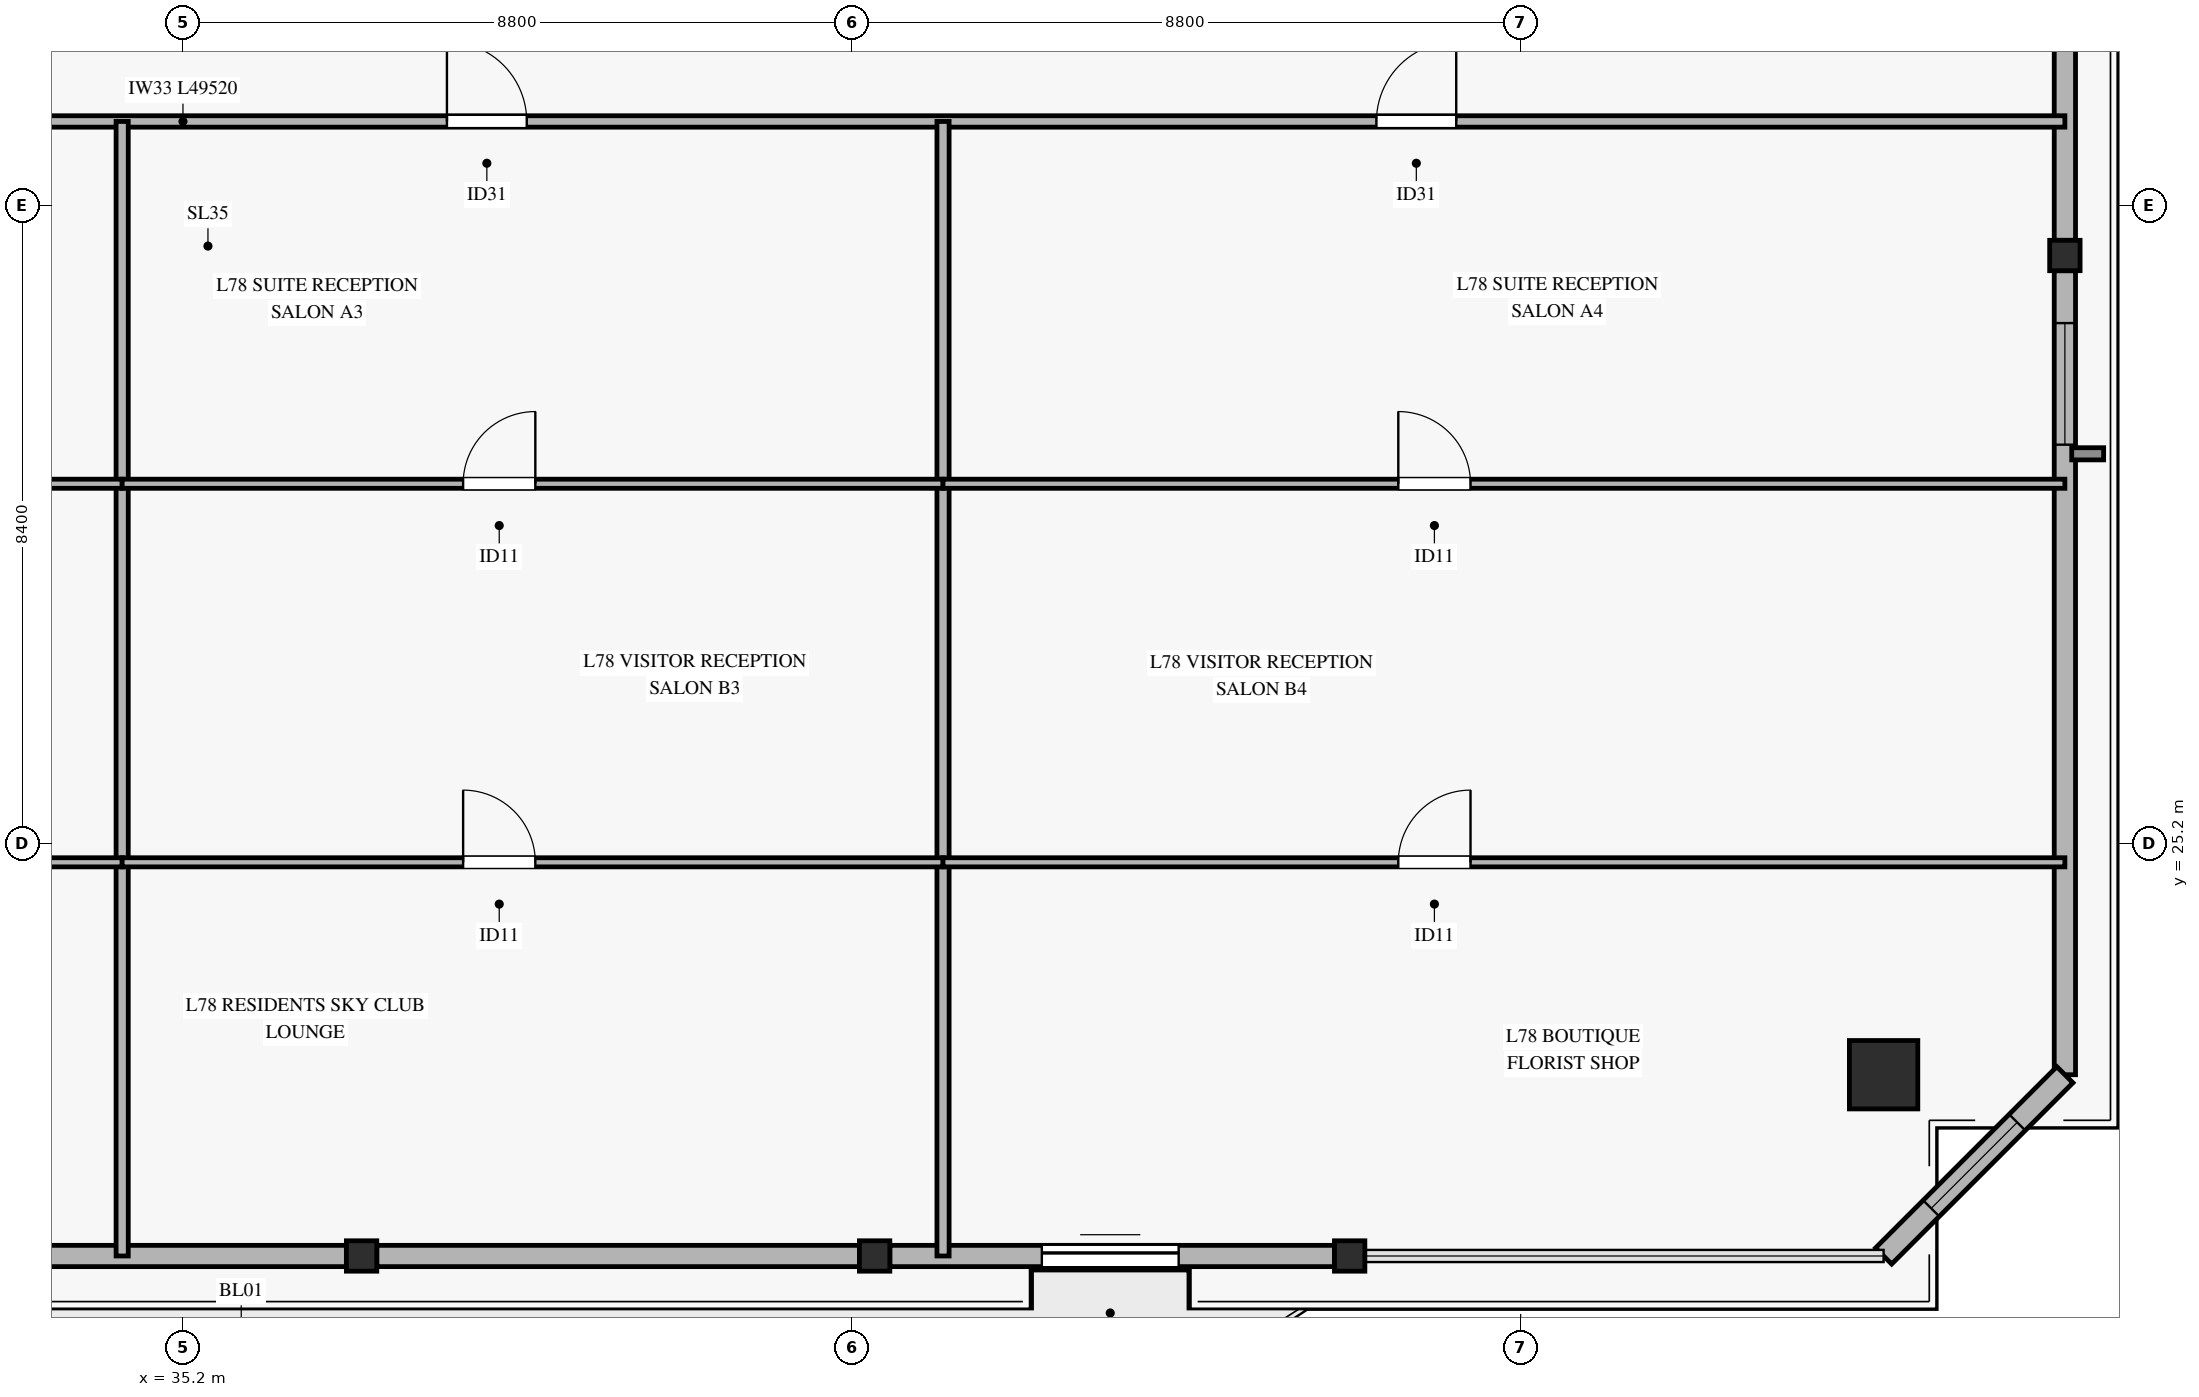
"""IFC4 building model, lengths in metres.
Left out: names, types, materials, properties, quantities, classifications, styles, units other than length and angle.
Written with IfcOpenShell. Run it as: python <this file> out.ifc"""

import sys

from ifc_helpers import new_model, si_unit, direction, frame, frame_2d, origin, origin_2d, place, context, subcontext, project, spatial, rectangle, hollow_rectangle, extrude, source, transform, mapped, element, fill, save


model = new_model("IFC4")
c1 = context("Model", 3, precision=1e-05, world=origin(), true_north=direction((0.0, 1.0)))
c2 = subcontext(c1, "Body", "Model", "MODEL_VIEW")
j1 = project(units=[si_unit("LENGTHUNIT", "METRE"), si_unit("PLANEANGLEUNIT", "RADIAN")], contexts=[c1])
p1 = place(None, origin())
s1 = spatial("IfcSite", under=j1, at=p1, CompositionType="ELEMENT")
p2 = place(p1, origin())
s2 = spatial("IfcBuilding", under=s1, at=p2, CompositionType="ELEMENT")
p3 = place(p2, frame((0.0, 0.0, 304.0)))
s3 = spatial("IfcBuildingStorey", under=s2, at=p3, CompositionType="ELEMENT", Elevation=304.0)
m1 = source(origin(), c2, "Body", "SweptSolid", [
    extrude(hollow_rectangle(XDim=0.9, YDim=0.9, WallThickness=0.04, at=origin_2d()), origin(), (0.0, 0.0, 1.0), 3.185),
])
p4 = place(p3, frame((57.575, 22.157, 0.0), z_axis=(0.0, 0.0, 1.0), x_axis=(1.0, 0.0, 0.0)))
e1 = element("IfcColumn", 1, at=p4, inside=s3, PredefinedType="COLUMN", context=c2, shape_type="MappedRepresentation", body=[
    mapped(m1, transform((0.0, 0.0, 0.0), x_axis=(1.0, 0.0, 0.0), y_axis=(0.0, 1.0, 0.0), z_axis=(0.0, 0.0, 1.0), scale=1.0)),
])
m2 = source(origin(), c2, "Body", "SweptSolid", [
    extrude(hollow_rectangle(XDim=0.4, YDim=0.4, WallThickness=0.02, at=origin_2d()), origin(), (0.0, 0.0, 1.0), 3.185),
])
for number, where, z_axis, x_axis in (
    (2, (37.55, 19.772, 0.0), (0.0, 0.0, 1.0), (1.0, 0.0, 0.0)),
    (3, (44.3, 19.772, 0.0), (0.0, 0.0, 1.0), (1.0, 0.0, 0.0)),
    (4, (50.55, 19.772, 0.0), (0.0, 0.0, 1.0), (1.0, 0.0, 0.0)),
    (5, (59.96, 32.936, 0.0), (0.0, 0.0, 1.0), (1.0, 0.0, 0.0)),
):
    element("IfcColumn", number, at=place(p3, frame(where, z_axis=z_axis, x_axis=x_axis)), inside=s3, PredefinedType="COLUMN", context=c2, shape_type="MappedRepresentation", body=[
        mapped(m2, transform((0.0, 0.0, 0.0), x_axis=(1.0, 0.0, 0.0), y_axis=(0.0, 1.0, 0.0), z_axis=(0.0, 0.0, 1.0), scale=1.0)),
    ])
for number, where, z_axis, x_axis in (
    (6, (31.0, 19.772, 0.0), (0.0, 0.0, 1.0), (1.0, 0.0, 0.0)),
    (7, (37.75, 19.772, 0.0), (0.0, 0.0, 1.0), (1.0, 0.0, 0.0)),
):
    element("IfcWall", number, at=place(p3, frame(where, z_axis=z_axis, x_axis=x_axis)), inside=s3, PredefinedType="SOLIDWALL", context=c2, shape_type="SweptSolid", body=[
        extrude(rectangle(XDim=6.35, YDim=0.28, at=frame_2d((3.175, 0.0))), origin(), (0.0, 0.0, 1.0), 2.815),
    ])
p5 = place(p3, frame((44.5, 19.772, 0.0), z_axis=(0.0, 0.0, 1.0), x_axis=(1.0, 0.0, 0.0)))
e8 = element("IfcWall", 8, at=p5, inside=s3, PredefinedType="SOLIDWALL", context=c2, shape_type="SweptSolid", body=[
    extrude(rectangle(XDim=5.85, YDim=0.28, at=frame_2d((2.925, 0.0))), origin(), (0.0, 0.0, 1.0), 2.815),
])
p6 = place(p5, frame((2.0, 0.0, 0.0)))
e9 = element("IfcOpeningElement", 9, at=p6, cuts=e8, PredefinedType="OPENING", context=c2, shape_type="SweptSolid", body=[
    extrude(rectangle(XDim=1.8, YDim=2.25, at=frame_2d((0.9, 1.125))), frame((0.0, 0.15, 0.0), z_axis=(0.0, -1.0, 0.0), x_axis=(1.0, 0.0, 0.0)), (0.0, 0.0, 1.0), 0.3),
])
p7 = place(p3, frame((59.96, 22.157, 0.0), z_axis=(0.0, 0.0, 1.0), x_axis=(0.0, 1.0, 0.0)))
e10 = element("IfcWall", 10, at=p7, inside=s3, PredefinedType="SOLIDWALL", context=c2, shape_type="SweptSolid", body=[
    extrude(rectangle(XDim=10.579, YDim=0.28, at=frame_2d((5.29, 0.0))), origin(), (0.0, 0.0, 1.0), 2.815),
])
p8 = place(p7, frame((8.29, 0.0, 0.45)))
e11 = element("IfcOpeningElement", 11, at=p8, cuts=e10, PredefinedType="OPENING", context=c2, shape_type="SweptSolid", body=[
    extrude(rectangle(XDim=1.6, YDim=2.0, at=frame_2d((0.8, 1.0))), frame((0.0, 0.15, 0.0), z_axis=(0.0, -1.0, 0.0), x_axis=(1.0, 0.0, 0.0)), (0.0, 0.0, 1.0), 0.3),
])
p9 = place(p3, frame((59.96, 33.136, 0.0), z_axis=(0.0, 0.0, 1.0), x_axis=(0.0, 1.0, 0.0)))
e12 = element("IfcWall", 12, at=p9, inside=s3, PredefinedType="SOLIDWALL", context=c2, shape_type="SweptSolid", body=[
    extrude(rectangle(XDim=10.579, YDim=0.28, at=frame_2d((5.29, 0.0))), origin(), (0.0, 0.0, 1.0), 2.815),
])
p10 = place(p9, frame((4.719, 0.0, 0.45)))
e13 = element("IfcOpeningElement", 13, at=p10, cuts=e12, PredefinedType="OPENING", context=c2, shape_type="SweptSolid", body=[
    extrude(rectangle(XDim=2.2, YDim=2.1, at=frame_2d((1.1, 1.05))), frame((0.0, 0.15, 0.0), z_axis=(0.0, -1.0, 0.0), x_axis=(1.0, 0.0, 0.0)), (0.0, 0.0, 1.0), 0.3),
])
p11 = place(p3, frame((57.575, 19.772, 0.0), z_axis=(0.0, 0.0, 1.0), x_axis=(0.707106781187, 0.707106781187, 0.0)))
e14 = element("IfcWall", 14, at=p11, inside=s3, PredefinedType="SOLIDWALL", context=c2, shape_type="SweptSolid", body=[
    extrude(rectangle(XDim=3.373, YDim=0.3, at=frame_2d((1.687, 0.0))), origin(), (0.0, 0.0, 1.0), 2.815),
])
p12 = place(p11, frame((0.886, 0.0, 0.45)))
e15 = element("IfcOpeningElement", 15, at=p12, cuts=e14, PredefinedType="OPENING", context=c2, shape_type="SweptSolid", body=[
    extrude(rectangle(XDim=1.6, YDim=2.0, at=frame_2d((0.8, 1.0))), frame((0.0, 0.16, 0.0), z_axis=(0.0, -1.0, 0.0), x_axis=(1.0, 0.0, 0.0)), (0.0, 0.0, 1.0), 0.32),
])
p13 = place(p3, frame((10.44, 34.7, 0.0), z_axis=(0.0, 0.0, 1.0), x_axis=(1.0, 0.0, 0.0)))
e16 = element("IfcWall", 16, at=p13, inside=s3, PredefinedType="PARTITIONING", context=c2, shape_type="SweptSolid", body=[
    extrude(rectangle(XDim=49.52, YDim=0.15, at=frame_2d((24.76, 0.0))), origin(), (0.0, 0.0, 1.0), 2.47),
])
p14 = place(p13, frame((4.382, 0.0, 0.0)))
e17 = element("IfcOpeningElement", 17, at=p14, cuts=e16, PredefinedType="OPENING", context=c2, shape_type="SweptSolid", body=[
    extrude(rectangle(XDim=1.05, YDim=2.15, at=frame_2d((0.525, 1.075))), frame((0.0, 0.085, 0.0), z_axis=(0.0, -1.0, 0.0), x_axis=(1.0, 0.0, 0.0)), (0.0, 0.0, 1.0), 0.17),
])
p15 = place(p13, frame((15.945, 0.0, 0.0)))
e18 = element("IfcOpeningElement", 18, at=p15, cuts=e16, PredefinedType="OPENING", context=c2, shape_type="SweptSolid", body=[
    extrude(rectangle(XDim=1.05, YDim=2.15, at=frame_2d((0.525, 1.075))), frame((0.0, 0.085, 0.0), z_axis=(0.0, -1.0, 0.0), x_axis=(1.0, 0.0, 0.0)), (0.0, 0.0, 1.0), 0.17),
])
p16 = place(p13, frame((28.233, 0.0, 0.0)))
e19 = element("IfcOpeningElement", 19, at=p16, cuts=e16, PredefinedType="OPENING", context=c2, shape_type="SweptSolid", body=[
    extrude(rectangle(XDim=1.05, YDim=2.15, at=frame_2d((0.525, 1.075))), frame((0.0, 0.085, 0.0), z_axis=(0.0, -1.0, 0.0), x_axis=(1.0, 0.0, 0.0)), (0.0, 0.0, 1.0), 0.17),
])
p17 = place(p13, frame((40.462, 0.0, 0.0)))
e20 = element("IfcOpeningElement", 20, at=p17, cuts=e16, PredefinedType="OPENING", context=c2, shape_type="SweptSolid", body=[
    extrude(rectangle(XDim=1.05, YDim=2.15, at=frame_2d((0.525, 1.075))), frame((0.0, 0.085, 0.0), z_axis=(0.0, -1.0, 0.0), x_axis=(1.0, 0.0, 0.0)), (0.0, 0.0, 1.0), 0.17),
])
for number, where, z_axis, x_axis in (
    (21, (34.4, 19.772, 0.0), (0.0, 0.0, 1.0), (0.0, 1.0, 0.0)),
    (22, (45.2, 19.772, 0.0), (0.0, 0.0, 1.0), (0.0, 1.0, 0.0)),
):
    element("IfcWall", number, at=place(p3, frame(where, z_axis=z_axis, x_axis=x_axis)), inside=s3, PredefinedType="PARTITIONING", context=c2, shape_type="SweptSolid", body=[
        extrude(rectangle(XDim=14.928, YDim=0.16, at=frame_2d((7.464, 0.0))), origin(), (0.0, 0.0, 1.0), 2.77),
    ])
p18 = place(p3, frame((21.2, 24.952, 0.0), z_axis=(0.0, 0.0, 1.0), x_axis=(1.0, 0.0, 0.0)))
e23 = element("IfcWall", 23, at=p18, inside=s3, PredefinedType="PARTITIONING", context=c2, shape_type="SweptSolid", body=[
    extrude(rectangle(XDim=13.2, YDim=0.12, at=frame_2d((6.6, 0.0))), origin(), (0.0, 0.0, 1.0), 2.47),
])
p19 = place(p18, frame((5.446, 0.0, 0.0)))
e24 = element("IfcOpeningElement", 24, at=p19, cuts=e23, PredefinedType="OPENING", context=c2, shape_type="SweptSolid", body=[
    extrude(rectangle(XDim=0.95, YDim=2.1, at=frame_2d((0.475, 1.05))), frame((0.0, 0.07, 0.0), z_axis=(0.0, -1.0, 0.0), x_axis=(1.0, 0.0, 0.0)), (0.0, 0.0, 1.0), 0.14),
])
p20 = place(p3, frame((21.2, 29.933, 0.0), z_axis=(0.0, 0.0, 1.0), x_axis=(1.0, 0.0, 0.0)))
e25 = element("IfcWall", 25, at=p20, inside=s3, PredefinedType="PARTITIONING", context=c2, shape_type="SweptSolid", body=[
    extrude(rectangle(XDim=13.2, YDim=0.12, at=frame_2d((6.6, 0.0))), origin(), (0.0, 0.0, 1.0), 2.47),
])
p21 = place(p20, frame((5.446, 0.0, 0.0)))
e26 = element("IfcOpeningElement", 26, at=p21, cuts=e25, PredefinedType="OPENING", context=c2, shape_type="SweptSolid", body=[
    extrude(rectangle(XDim=0.95, YDim=2.1, at=frame_2d((0.475, 1.05))), frame((0.0, 0.07, 0.0), z_axis=(0.0, -1.0, 0.0), x_axis=(1.0, 0.0, 0.0)), (0.0, 0.0, 1.0), 0.14),
])
p22 = place(p3, frame((34.4, 24.952, 0.0), z_axis=(0.0, 0.0, 1.0), x_axis=(1.0, 0.0, 0.0)))
e27 = element("IfcWall", 27, at=p22, inside=s3, PredefinedType="PARTITIONING", context=c2, shape_type="SweptSolid", body=[
    extrude(rectangle(XDim=10.8, YDim=0.12, at=frame_2d((5.4, 0.0))), origin(), (0.0, 0.0, 1.0), 2.47),
])
p23 = place(p22, frame((4.486, 0.0, 0.0)))
e28 = element("IfcOpeningElement", 28, at=p23, cuts=e27, PredefinedType="OPENING", context=c2, shape_type="SweptSolid", body=[
    extrude(rectangle(XDim=0.95, YDim=2.1, at=frame_2d((0.475, 1.05))), frame((0.0, 0.07, 0.0), z_axis=(0.0, -1.0, 0.0), x_axis=(1.0, 0.0, 0.0)), (0.0, 0.0, 1.0), 0.14),
])
p24 = place(p3, frame((34.4, 29.933, 0.0), z_axis=(0.0, 0.0, 1.0), x_axis=(1.0, 0.0, 0.0)))
e29 = element("IfcWall", 29, at=p24, inside=s3, PredefinedType="PARTITIONING", context=c2, shape_type="SweptSolid", body=[
    extrude(rectangle(XDim=10.8, YDim=0.12, at=frame_2d((5.4, 0.0))), origin(), (0.0, 0.0, 1.0), 2.47),
])
p25 = place(p24, frame((4.486, 0.0, 0.0)))
e30 = element("IfcOpeningElement", 30, at=p25, cuts=e29, PredefinedType="OPENING", context=c2, shape_type="SweptSolid", body=[
    extrude(rectangle(XDim=0.95, YDim=2.1, at=frame_2d((0.475, 1.05))), frame((0.0, 0.07, 0.0), z_axis=(0.0, -1.0, 0.0), x_axis=(1.0, 0.0, 0.0)), (0.0, 0.0, 1.0), 0.14),
])
p26 = place(p3, frame((45.2, 24.952, 0.0), z_axis=(0.0, 0.0, 1.0), x_axis=(1.0, 0.0, 0.0)))
e31 = element("IfcWall", 31, at=p26, inside=s3, PredefinedType="PARTITIONING", context=c2, shape_type="SweptSolid", body=[
    extrude(rectangle(XDim=14.76, YDim=0.12, at=frame_2d((7.38, 0.0))), origin(), (0.0, 0.0, 1.0), 2.47),
])
p27 = place(p26, frame((5.99, 0.0, 0.0)))
e32 = element("IfcOpeningElement", 32, at=p27, cuts=e31, PredefinedType="OPENING", context=c2, shape_type="SweptSolid", body=[
    extrude(rectangle(XDim=0.95, YDim=2.1, at=frame_2d((0.475, 1.05))), frame((0.0, 0.07, 0.0), z_axis=(0.0, -1.0, 0.0), x_axis=(1.0, 0.0, 0.0)), (0.0, 0.0, 1.0), 0.14),
])
p28 = place(p3, frame((45.2, 29.933, 0.0), z_axis=(0.0, 0.0, 1.0), x_axis=(1.0, 0.0, 0.0)))
e33 = element("IfcWall", 33, at=p28, inside=s3, PredefinedType="PARTITIONING", context=c2, shape_type="SweptSolid", body=[
    extrude(rectangle(XDim=14.76, YDim=0.12, at=frame_2d((7.38, 0.0))), origin(), (0.0, 0.0, 1.0), 2.47),
])
p29 = place(p28, frame((5.99, 0.0, 0.0)))
e34 = element("IfcOpeningElement", 34, at=p29, cuts=e33, PredefinedType="OPENING", context=c2, shape_type="SweptSolid", body=[
    extrude(rectangle(XDim=0.95, YDim=2.1, at=frame_2d((0.475, 1.05))), frame((0.0, 0.07, 0.0), z_axis=(0.0, -1.0, 0.0), x_axis=(1.0, 0.0, 0.0)), (0.0, 0.0, 1.0), 0.14),
])
m3 = source(origin(), c2, "Body", "SweptSolid", [
    extrude(rectangle(XDim=1.8, YDim=2.25, at=frame_2d((0.9, 1.125))), frame((0.0, 0.025, 0.0), z_axis=(0.0, -1.0, 0.0), x_axis=(1.0, 0.0, 0.0)), (0.0, 0.0, 1.0), 0.05),
])
p30 = place(p6, origin())
e35 = element("IfcDoor", 35, at=p30, inside=s3, OperationType="SLIDING_TO_LEFT", PredefinedType="DOOR", context=c2, shape_type="MappedRepresentation", body=[
    mapped(m3, transform((0.0, 0.0, 0.0), x_axis=(1.0, 0.0, 0.0), y_axis=(0.0, 1.0, 0.0), z_axis=(0.0, 0.0, 1.0), scale=1.0)),
])
fill(e9, e35)
m4 = source(origin(), c2, "Body", "SweptSolid", [
    extrude(rectangle(XDim=1.6, YDim=2.0, at=frame_2d((0.8, 1.0))), frame((0.0, 0.03, 0.0), z_axis=(0.0, -1.0, 0.0), x_axis=(1.0, 0.0, 0.0)), (0.0, 0.0, 1.0), 0.06),
])
p31 = place(p8, origin())
e36 = element("IfcWindow", 36, at=p31, inside=s3, PartitioningType="SINGLE_PANEL", PredefinedType="WINDOW", context=c2, shape_type="MappedRepresentation", body=[
    mapped(m4, transform((0.0, 0.0, 0.0), x_axis=(1.0, 0.0, 0.0), y_axis=(0.0, 1.0, 0.0), z_axis=(0.0, 0.0, 1.0), scale=1.0)),
])
fill(e11, e36)
p32 = place(p12, origin())
e37 = element("IfcWindow", 37, at=p32, inside=s3, PartitioningType="SINGLE_PANEL", PredefinedType="WINDOW", context=c2, shape_type="MappedRepresentation", body=[
    mapped(m4, transform((0.0, 0.0, 0.0), x_axis=(1.0, 0.0, 0.0), y_axis=(0.0, 1.0, 0.0), z_axis=(0.0, 0.0, 1.0), scale=1.0)),
])
fill(e15, e37)
m5 = source(origin(), c2, "Body", "SweptSolid", [
    extrude(rectangle(XDim=1.05, YDim=2.15, at=frame_2d((0.525, 1.075))), frame((0.0, 0.025, 0.0), z_axis=(0.0, -1.0, 0.0), x_axis=(1.0, 0.0, 0.0)), (0.0, 0.0, 1.0), 0.05),
])
p33 = place(p16, origin())
e38 = element("IfcDoor", 38, at=p33, inside=s3, OperationType="SINGLE_SWING_LEFT", PredefinedType="DOOR", context=c2, shape_type="MappedRepresentation", body=[
    mapped(m5, transform((0.0, 0.0, 0.0), x_axis=(1.0, 0.0, 0.0), y_axis=(0.0, 1.0, 0.0), z_axis=(0.0, 0.0, 1.0), scale=1.0)),
])
fill(e19, e38)
m6 = source(origin(), c2, "Body", "SweptSolid", [
    extrude(rectangle(XDim=0.95, YDim=2.1, at=frame_2d((0.475, 1.05))), frame((0.0, 0.025, 0.0), z_axis=(0.0, -1.0, 0.0), x_axis=(1.0, 0.0, 0.0)), (0.0, 0.0, 1.0), 0.05),
])
p34 = place(p25, origin())
e39 = element("IfcDoor", 39, at=p34, inside=s3, OperationType="SINGLE_SWING_RIGHT", PredefinedType="DOOR", context=c2, shape_type="MappedRepresentation", body=[
    mapped(m6, transform((0.0, 0.0, 0.0), x_axis=(1.0, 0.0, 0.0), y_axis=(0.0, 1.0, 0.0), z_axis=(0.0, 0.0, 1.0), scale=1.0)),
])
fill(e30, e39)
p35 = place(p23, origin())
e40 = element("IfcDoor", 40, at=p35, inside=s3, OperationType="SINGLE_SWING_LEFT", PredefinedType="DOOR", context=c2, shape_type="MappedRepresentation", body=[
    mapped(m6, transform((0.0, 0.0, 0.0), x_axis=(1.0, 0.0, 0.0), y_axis=(0.0, 1.0, 0.0), z_axis=(0.0, 0.0, 1.0), scale=1.0)),
])
fill(e28, e40)
p36 = place(p17, origin())
e41 = element("IfcDoor", 41, at=p36, inside=s3, OperationType="SINGLE_SWING_RIGHT", PredefinedType="DOOR", context=c2, shape_type="MappedRepresentation", body=[
    mapped(m5, transform((0.0, 0.0, 0.0), x_axis=(1.0, 0.0, 0.0), y_axis=(0.0, 1.0, 0.0), z_axis=(0.0, 0.0, 1.0), scale=1.0)),
])
fill(e20, e41)
p37 = place(p29, origin())
e42 = element("IfcDoor", 42, at=p37, inside=s3, OperationType="SINGLE_SWING_LEFT", PredefinedType="DOOR", context=c2, shape_type="MappedRepresentation", body=[
    mapped(m6, transform((0.0, 0.0, 0.0), x_axis=(1.0, 0.0, 0.0), y_axis=(0.0, 1.0, 0.0), z_axis=(0.0, 0.0, 1.0), scale=1.0)),
])
fill(e34, e42)
p38 = place(p27, origin())
e43 = element("IfcDoor", 43, at=p38, inside=s3, OperationType="SINGLE_SWING_RIGHT", PredefinedType="DOOR", context=c2, shape_type="MappedRepresentation", body=[
    mapped(m6, transform((0.0, 0.0, 0.0), x_axis=(1.0, 0.0, 0.0), y_axis=(0.0, 1.0, 0.0), z_axis=(0.0, 0.0, 1.0), scale=1.0)),
])
fill(e32, e43)
save(model, sys.argv[1])
